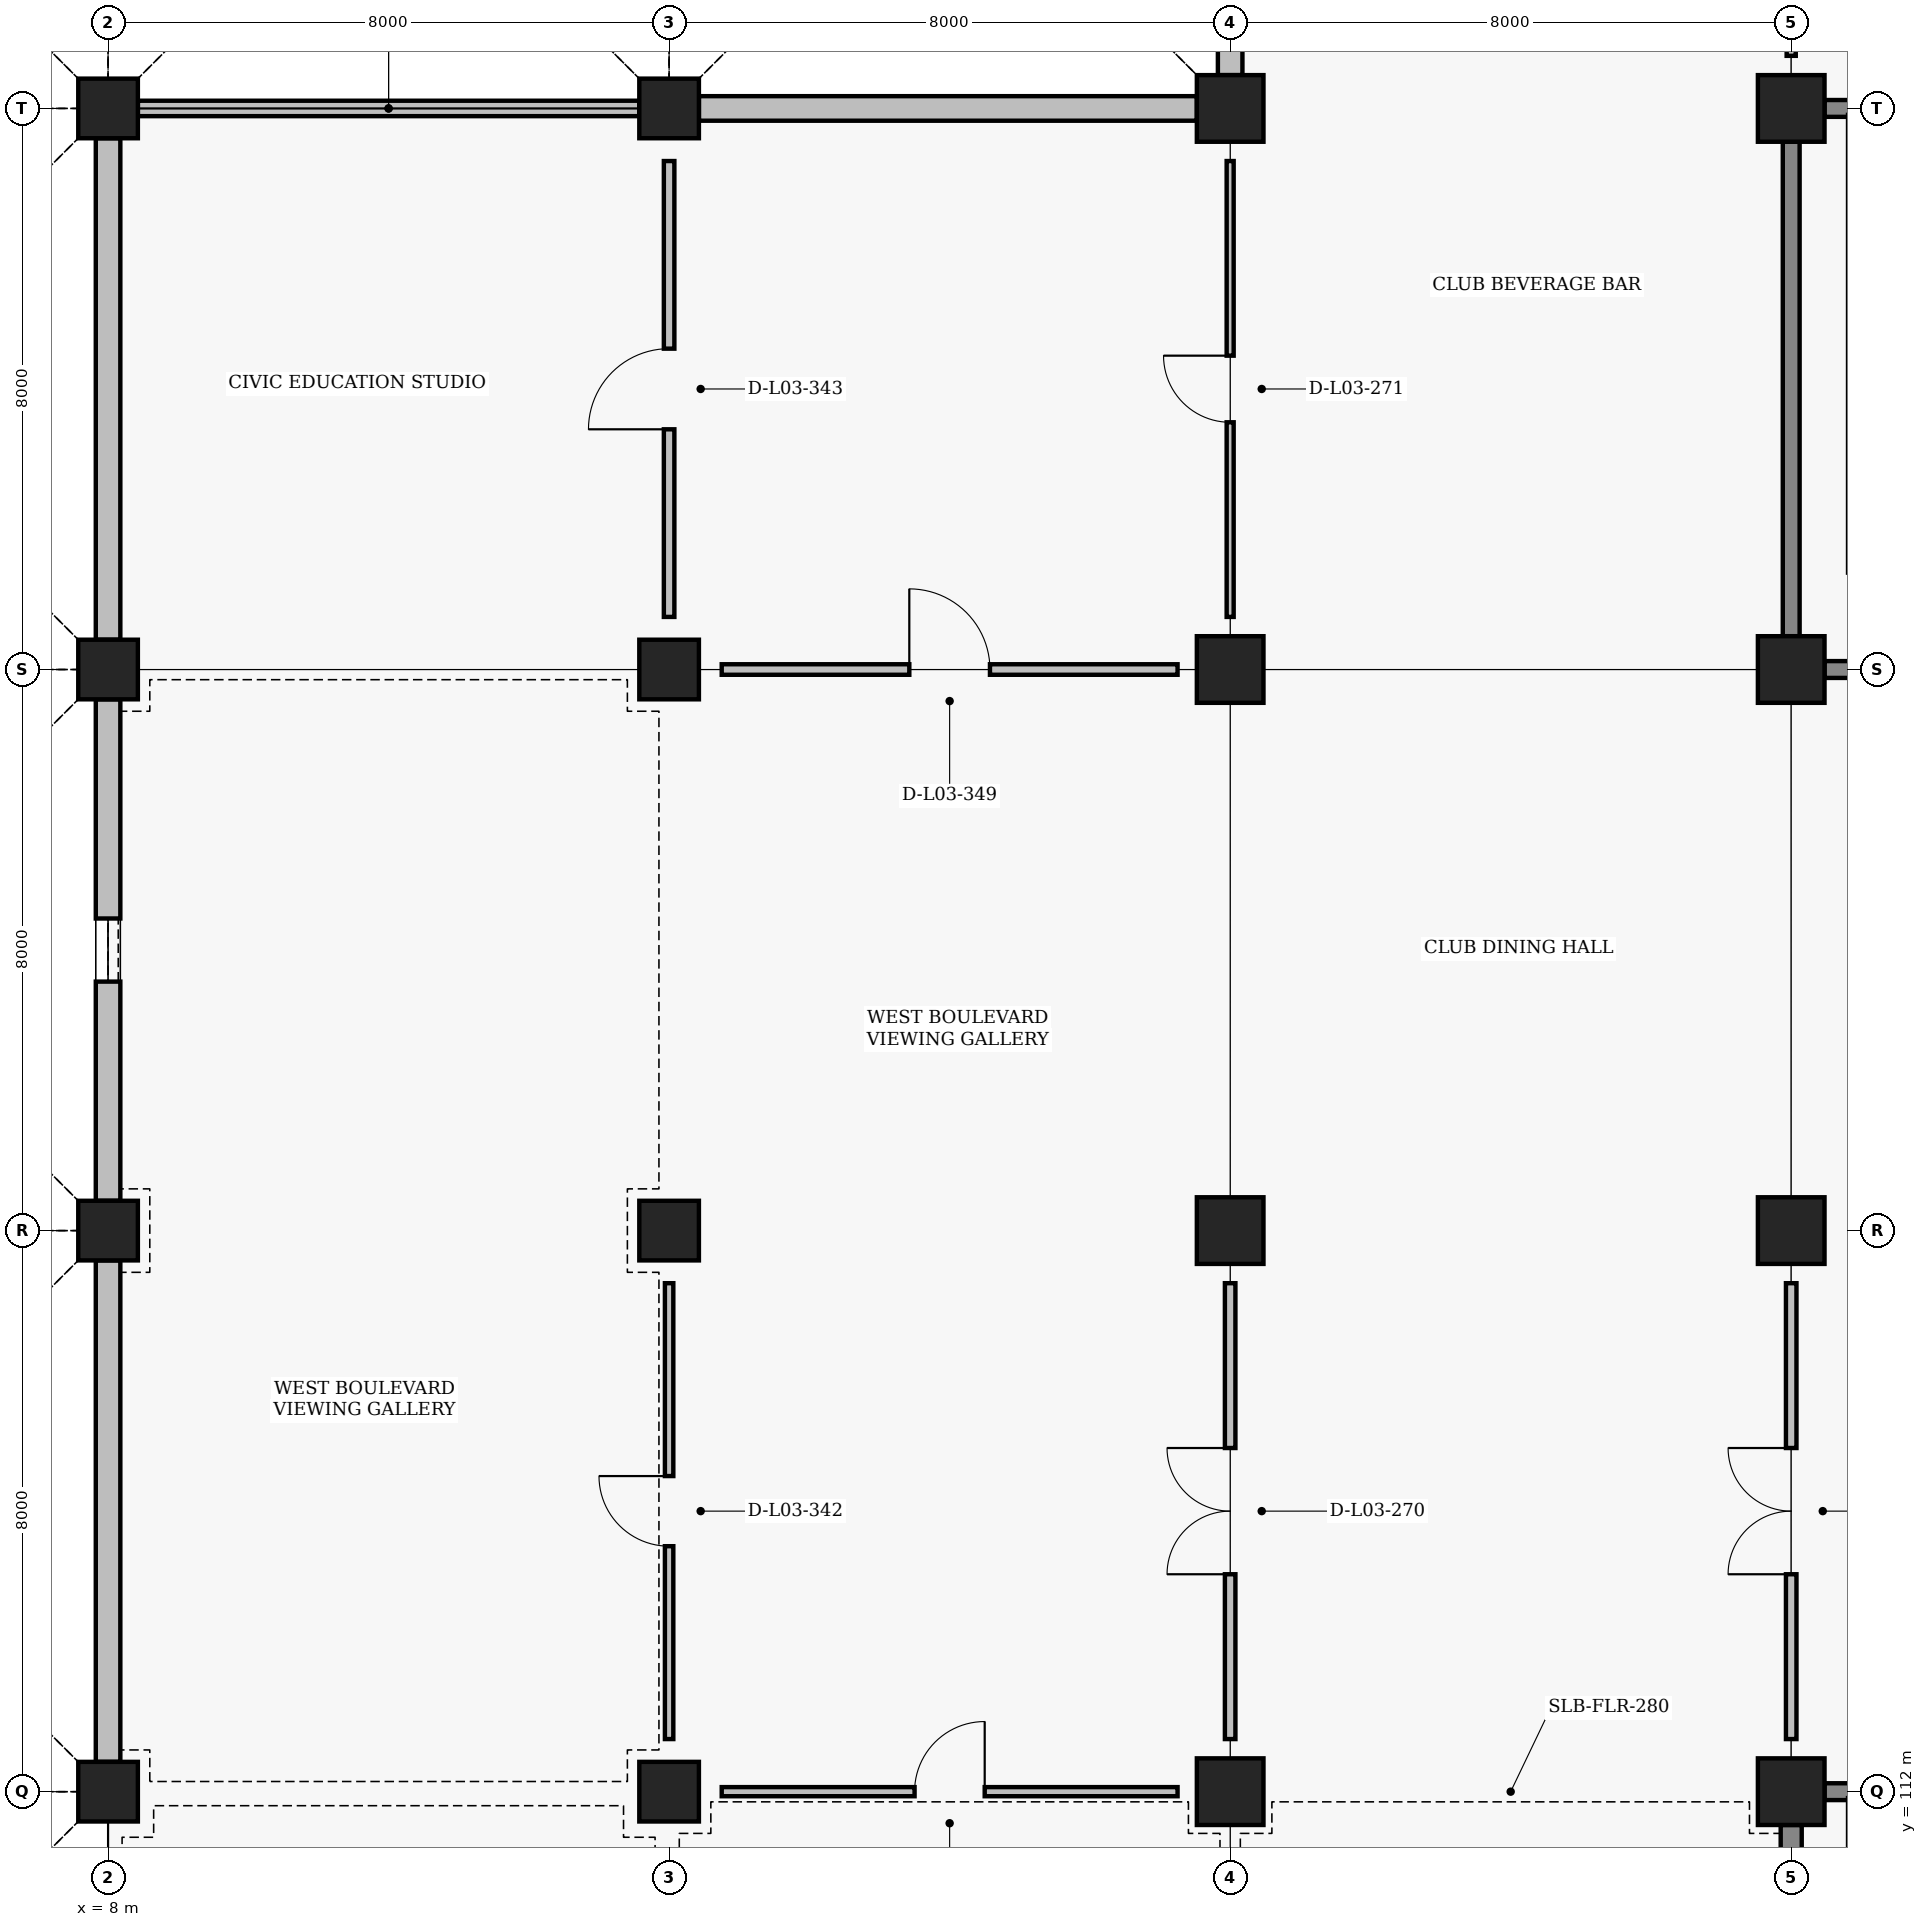
"""IFC4 building model, lengths in metres.
Left out: names, types, materials, properties, quantities, classifications, styles, units other than length and angle.
Written with IfcOpenShell. Run it as: python <this file> out.ifc"""

import sys

from ifc_helpers import new_model, si_unit, direction, frame, frame_2d, origin, origin_2d, place, context, subcontext, project, spatial, rectangle, circle, extrude, element, fill, save


model = new_model("IFC4")
c1 = context("Model", 3, precision=1e-05, world=origin(), true_north=direction((0.0, 1.0)))
c2 = subcontext(c1, "Body", "Model", "MODEL_VIEW")
j1 = project(units=[si_unit("LENGTHUNIT", "METRE"), si_unit("PLANEANGLEUNIT", "RADIAN")], contexts=[c1])
p1 = place(None, origin())
s1 = spatial("IfcSite", under=j1, at=p1, CompositionType="ELEMENT")
p2 = place(p1, origin())
s2 = spatial("IfcBuilding", under=s1, at=p2, CompositionType="ELEMENT")
p3 = place(p2, frame((0.0, 0.0, 9.6)))
s3 = spatial("IfcBuildingStorey", under=s2, at=p3, CompositionType="ELEMENT", Elevation=9.6)
for number, where, z_axis, x_axis in (
    (1, (8.0, 112.0, 0.0), (0.0, 0.0, 1.0), (1.0, 0.0, 0.0)),
    (2, (8.0, 120.0, 0.0), (0.0, 0.0, 1.0), (1.0, 0.0, 0.0)),
    (3, (8.0, 128.0, 0.0), (0.0, 0.0, 1.0), (1.0, 0.0, 0.0)),
    (4, (8.0, 136.0, 0.0), (0.0, 0.0, 1.0), (1.0, 0.0, 0.0)),
    (5, (16.0, 112.0, 0.0), (0.0, 0.0, 1.0), (1.0, 0.0, 0.0)),
    (6, (16.0, 120.0, 0.0), (0.0, 0.0, 1.0), (1.0, 0.0, 0.0)),
    (7, (16.0, 128.0, 0.0), (0.0, 0.0, 1.0), (1.0, 0.0, 0.0)),
    (8, (16.0, 136.0, 0.0), (0.0, 0.0, 1.0), (1.0, 0.0, 0.0)),
):
    element("IfcColumn", number, at=place(p3, frame(where, z_axis=z_axis, x_axis=x_axis)), inside=s3, PredefinedType="COLUMN", context=c2, shape_type="SweptSolid", body=[
        extrude(circle(Radius=0.425, at=origin_2d()), origin(), (0.0, 0.0, 1.0), 4.8),
    ])
for number, where, z_axis, x_axis in (
    (9, (24.0, 112.0, 0.0), (0.0, 0.0, 1.0), (1.0, 0.0, 0.0)),
    (10, (24.0, 120.0, 0.0), (0.0, 0.0, 1.0), (1.0, 0.0, 0.0)),
    (11, (24.0, 128.0, 0.0), (0.0, 0.0, 1.0), (1.0, 0.0, 0.0)),
    (12, (24.0, 136.0, 0.0), (0.0, 0.0, 1.0), (1.0, 0.0, 0.0)),
    (13, (32.0, 112.0, 0.0), (0.0, 0.0, 1.0), (1.0, 0.0, 0.0)),
    (14, (32.0, 120.0, 0.0), (0.0, 0.0, 1.0), (1.0, 0.0, 0.0)),
    (15, (32.0, 128.0, 0.0), (0.0, 0.0, 1.0), (1.0, 0.0, 0.0)),
    (16, (32.0, 136.0, 0.0), (0.0, 0.0, 1.0), (1.0, 0.0, 0.0)),
):
    element("IfcColumn", number, at=place(p3, frame(where, z_axis=z_axis, x_axis=x_axis)), inside=s3, PredefinedType="COLUMN", context=c2, shape_type="SweptSolid", body=[
        extrude(rectangle(XDim=0.95, YDim=0.95, at=origin_2d()), origin(), (0.0, 0.0, 1.0), 4.8),
    ])
p4 = place(p3, frame((8.0, 112.425, 0.0), z_axis=(0.0, 0.0, 1.0), x_axis=(0.0, 1.0, 0.0)))
e17 = element("IfcWall", 17, at=p4, inside=s3, PredefinedType="SOLIDWALL", context=c2, shape_type="SweptSolid", body=[
    extrude(rectangle(XDim=7.15, YDim=0.35, at=frame_2d((3.575, 0.0))), origin(), (0.0, 0.0, 1.0), 3.72),
])
p5 = place(p3, frame((8.0, 120.425, 0.0), z_axis=(0.0, 0.0, 1.0), x_axis=(0.0, 1.0, 0.0)))
e18 = element("IfcWall", 18, at=p5, inside=s3, PredefinedType="SOLIDWALL", context=c2, shape_type="SweptSolid", body=[
    extrude(rectangle(XDim=7.15, YDim=0.35, at=frame_2d((3.575, 0.0))), origin(), (0.0, 0.0, 1.0), 3.72),
])
p6 = place(p5, frame((3.125, 0.0, 0.95)))
e19 = element("IfcOpeningElement", 19, at=p6, cuts=e18, PredefinedType="OPENING", context=c2, shape_type="SweptSolid", body=[
    extrude(rectangle(XDim=0.9, YDim=1.5, at=frame_2d((0.45, 0.75))), frame((0.0, 0.185, 0.0), z_axis=(0.0, -1.0, 0.0), x_axis=(1.0, 0.0, 0.0)), (0.0, 0.0, 1.0), 0.37),
])
p7 = place(p3, frame((8.425, 136.0, 0.0), z_axis=(0.0, 0.0, 1.0), x_axis=(1.0, 0.0, 0.0)))
e20 = element("IfcWall", 20, at=p7, inside=s3, PredefinedType="PARAPET", context=c2, shape_type="SweptSolid", body=[
    extrude(rectangle(XDim=7.15, YDim=0.22, at=frame_2d((3.575, 0.0))), origin(), (0.0, 0.0, 1.0), 0.16),
])
p8 = place(p3, frame((8.0, 128.425, 0.0), z_axis=(0.0, 0.0, 1.0), x_axis=(0.0, 1.0, 0.0)))
e21 = element("IfcWall", 21, at=p8, inside=s3, PredefinedType="SOLIDWALL", context=c2, shape_type="SweptSolid", body=[
    extrude(rectangle(XDim=7.15, YDim=0.35, at=frame_2d((3.575, 0.0))), origin(), (0.0, 0.0, 1.0), 3.95),
])
p9 = place(p3, frame((16.425, 136.0, 0.0), z_axis=(0.0, 0.0, 1.0), x_axis=(1.0, 0.0, 0.0)))
e22 = element("IfcWall", 22, at=p9, inside=s3, PredefinedType="SOLIDWALL", context=c2, shape_type="SweptSolid", body=[
    extrude(rectangle(XDim=7.1, YDim=0.35, at=frame_2d((3.55, 0.0))), origin(), (0.0, 0.0, 1.0), 3.93),
])
p10 = place(p3, frame((24.0, 136.475, 0.0), z_axis=(0.0, 0.0, 1.0), x_axis=(0.0, 1.0, 0.0)))
e23 = element("IfcWall", 23, at=p10, inside=s3, PredefinedType="SOLIDWALL", context=c2, shape_type="SweptSolid", body=[
    extrude(rectangle(XDim=7.05, YDim=0.35, at=frame_2d((3.525, 0.0))), origin(), (0.0, 0.0, 1.0), 3.93),
])
p11 = place(p3, frame((32.475, 112.0, 0.0), z_axis=(0.0, 0.0, 1.0), x_axis=(1.0, 0.0, 0.0)))
e24 = element("IfcWall", 24, at=p11, inside=s3, PredefinedType="SHEAR", context=c2, shape_type="SweptSolid", body=[
    extrude(rectangle(XDim=7.05, YDim=0.24, at=frame_2d((3.525, 0.0))), origin(), (0.0, 0.0, 1.0), 3.93),
])
p12 = place(p3, frame((32.0, 104.475, 0.0), z_axis=(0.0, 0.0, 1.0), x_axis=(0.0, 1.0, 0.0)))
e25 = element("IfcWall", 25, at=p12, inside=s3, PredefinedType="SHEAR", context=c2, shape_type="SweptSolid", body=[
    extrude(rectangle(XDim=7.05, YDim=0.3, at=frame_2d((3.525, 0.0))), origin(), (0.0, 0.0, 1.0), 3.68),
])
p13 = place(p3, frame((32.475, 128.0, 0.0), z_axis=(0.0, 0.0, 1.0), x_axis=(1.0, 0.0, 0.0)))
e26 = element("IfcWall", 26, at=p13, inside=s3, PredefinedType="SHEAR", context=c2, shape_type="SweptSolid", body=[
    extrude(rectangle(XDim=7.05, YDim=0.24, at=frame_2d((3.525, 0.0))), origin(), (0.0, 0.0, 1.0), 3.93),
])
p14 = place(p13, frame((4.9, 0.0, 0.0)))
e27 = element("IfcOpeningElement", 27, at=p14, cuts=e26, PredefinedType="OPENING", context=c2, shape_type="SweptSolid", body=[
    extrude(rectangle(XDim=1.1, YDim=2.2, at=frame_2d((0.55, 1.1))), frame((0.0, 0.13, 0.0), z_axis=(0.0, -1.0, 0.0), x_axis=(1.0, 0.0, 0.0)), (0.0, 0.0, 1.0), 0.26),
])
for number, where, z_axis, x_axis in (
    (28, (32.475, 136.0, 0.0), (0.0, 0.0, 1.0), (1.0, 0.0, 0.0)),
    (29, (32.0, 128.475, 0.0), (0.0, 0.0, 1.0), (0.0, 1.0, 0.0)),
):
    element("IfcWall", number, at=place(p3, frame(where, z_axis=z_axis, x_axis=x_axis)), inside=s3, PredefinedType="SHEAR", context=c2, shape_type="SweptSolid", body=[
        extrude(rectangle(XDim=7.05, YDim=0.24, at=frame_2d((3.525, 0.0))), origin(), (0.0, 0.0, 1.0), 3.93),
    ])
p15 = place(p3, frame((24.0, 112.75, 0.0), z_axis=(0.0, 0.0, 1.0), x_axis=(0.0, 1.0, 0.0)))
e30 = element("IfcWall", 30, at=p15, inside=s3, PredefinedType="PARTITIONING", context=c2, shape_type="SweptSolid", body=[
    extrude(rectangle(XDim=6.5, YDim=0.15, at=frame_2d((3.25, 0.0))), origin(), (0.0, 0.0, 1.0), 3.93),
])
p16 = place(p15, frame((2.35, 0.0, 0.0)))
e31 = element("IfcOpeningElement", 31, at=p16, cuts=e30, PredefinedType="OPENING", context=c2, shape_type="SweptSolid", body=[
    extrude(rectangle(XDim=1.8, YDim=2.3, at=frame_2d((0.9, 1.15))), frame((0.0, 0.085, 0.0), z_axis=(0.0, -1.0, 0.0), x_axis=(1.0, 0.0, 0.0)), (0.0, 0.0, 1.0), 0.17),
])
p17 = place(p3, frame((24.0, 128.75, 0.0), z_axis=(0.0, 0.0, 1.0), x_axis=(0.0, 1.0, 0.0)))
e32 = element("IfcWall", 32, at=p17, inside=s3, PredefinedType="PARTITIONING", context=c2, shape_type="SweptSolid", body=[
    extrude(rectangle(XDim=6.5, YDim=0.1, at=frame_2d((3.25, 0.0))), origin(), (0.0, 0.0, 1.0), 3.93),
])
p18 = place(p17, frame((2.775, 0.0, 0.0)))
e33 = element("IfcOpeningElement", 33, at=p18, cuts=e32, PredefinedType="OPENING", context=c2, shape_type="SweptSolid", body=[
    extrude(rectangle(XDim=0.95, YDim=2.1, at=frame_2d((0.475, 1.05))), frame((0.0, 0.06, 0.0), z_axis=(0.0, -1.0, 0.0), x_axis=(1.0, 0.0, 0.0)), (0.0, 0.0, 1.0), 0.12),
])
p19 = place(p3, frame((32.0, 112.75, 0.0), z_axis=(0.0, 0.0, 1.0), x_axis=(0.0, 1.0, 0.0)))
e34 = element("IfcWall", 34, at=p19, inside=s3, PredefinedType="PARTITIONING", context=c2, shape_type="SweptSolid", body=[
    extrude(rectangle(XDim=6.5, YDim=0.15, at=frame_2d((3.25, 0.0))), origin(), (0.0, 0.0, 1.0), 3.93),
])
p20 = place(p19, frame((2.35, 0.0, 0.0)))
e35 = element("IfcOpeningElement", 35, at=p20, cuts=e34, PredefinedType="OPENING", context=c2, shape_type="SweptSolid", body=[
    extrude(rectangle(XDim=1.8, YDim=2.3, at=frame_2d((0.9, 1.15))), frame((0.0, 0.085, 0.0), z_axis=(0.0, -1.0, 0.0), x_axis=(1.0, 0.0, 0.0)), (0.0, 0.0, 1.0), 0.17),
])
p21 = place(p3, frame((32.0, 136.75, 0.0), z_axis=(0.0, 0.0, 1.0), x_axis=(0.0, 1.0, 0.0)))
e36 = element("IfcWall", 36, at=p21, inside=s3, PredefinedType="PARTITIONING", context=c2, shape_type="SweptSolid", body=[
    extrude(rectangle(XDim=6.5, YDim=0.13, at=frame_2d((3.25, 0.0))), origin(), (0.0, 0.0, 1.0), 3.93),
])
p22 = place(p21, frame((2.75, 0.0, 0.0)))
e37 = element("IfcOpeningElement", 37, at=p22, cuts=e36, PredefinedType="OPENING", context=c2, shape_type="SweptSolid", body=[
    extrude(rectangle(XDim=1.0, YDim=2.1, at=frame_2d((0.5, 1.05))), frame((0.0, 0.075, 0.0), z_axis=(0.0, -1.0, 0.0), x_axis=(1.0, 0.0, 0.0)), (0.0, 0.0, 1.0), 0.15),
])
p23 = place(p3, frame((16.0, 112.75, 0.0), z_axis=(0.0, 0.0, 1.0), x_axis=(0.0, 1.0, 0.0)))
e38 = element("IfcWall", 38, at=p23, inside=s3, PredefinedType="PARTITIONING", context=c2, shape_type="SweptSolid", body=[
    extrude(rectangle(XDim=6.5, YDim=0.12, at=frame_2d((3.25, 0.0))), origin(), (0.0, 0.0, 1.0), 3.97),
])
p24 = place(p23, frame((2.75, 0.0, 0.0)))
e39 = element("IfcOpeningElement", 39, at=p24, cuts=e38, PredefinedType="OPENING", context=c2, shape_type="SweptSolid", body=[
    extrude(rectangle(XDim=1.0, YDim=2.1, at=frame_2d((0.5, 1.05))), frame((0.0, 0.07, 0.0), z_axis=(0.0, -1.0, 0.0), x_axis=(1.0, 0.0, 0.0)), (0.0, 0.0, 1.0), 0.14),
])
p25 = place(p3, frame((16.0, 128.75, 0.0), z_axis=(0.0, 0.0, 1.0), x_axis=(0.0, 1.0, 0.0)))
e40 = element("IfcWall", 40, at=p25, inside=s3, PredefinedType="PARTITIONING", context=c2, shape_type="SweptSolid", body=[
    extrude(rectangle(XDim=6.5, YDim=0.15, at=frame_2d((3.25, 0.0))), origin(), (0.0, 0.0, 1.0), 3.97),
])
p26 = place(p25, frame((2.675, 0.0, 0.0)))
e41 = element("IfcOpeningElement", 41, at=p26, cuts=e40, PredefinedType="OPENING", context=c2, shape_type="SweptSolid", body=[
    extrude(rectangle(XDim=1.15, YDim=2.15, at=frame_2d((0.575, 1.075))), frame((0.0, 0.085, 0.0), z_axis=(0.0, -1.0, 0.0), x_axis=(1.0, 0.0, 0.0)), (0.0, 0.0, 1.0), 0.17),
])
p27 = place(p3, frame((16.75, 112.0, 0.0), z_axis=(0.0, 0.0, 1.0), x_axis=(1.0, 0.0, 0.0)))
e42 = element("IfcWall", 42, at=p27, inside=s3, PredefinedType="PARTITIONING", context=c2, shape_type="SweptSolid", body=[
    extrude(rectangle(XDim=6.5, YDim=0.13, at=frame_2d((3.25, 0.0))), origin(), (0.0, 0.0, 1.0), 3.72),
])
p28 = place(p27, frame((2.75, 0.0, 0.0)))
e43 = element("IfcOpeningElement", 43, at=p28, cuts=e42, PredefinedType="OPENING", context=c2, shape_type="SweptSolid", body=[
    extrude(rectangle(XDim=1.0, YDim=2.1, at=frame_2d((0.5, 1.05))), frame((0.0, 0.075, 0.0), z_axis=(0.0, -1.0, 0.0), x_axis=(1.0, 0.0, 0.0)), (0.0, 0.0, 1.0), 0.15),
])
p29 = place(p3, frame((16.75, 128.0, 0.0), z_axis=(0.0, 0.0, 1.0), x_axis=(1.0, 0.0, 0.0)))
e44 = element("IfcWall", 44, at=p29, inside=s3, PredefinedType="PARTITIONING", context=c2, shape_type="SweptSolid", body=[
    extrude(rectangle(XDim=6.5, YDim=0.15, at=frame_2d((3.25, 0.0))), origin(), (0.0, 0.0, 1.0), 3.97),
])
p30 = place(p29, frame((2.675, 0.0, 0.0)))
e45 = element("IfcOpeningElement", 45, at=p30, cuts=e44, PredefinedType="OPENING", context=c2, shape_type="SweptSolid", body=[
    extrude(rectangle(XDim=1.15, YDim=2.15, at=frame_2d((0.575, 1.075))), frame((0.0, 0.085, 0.0), z_axis=(0.0, -1.0, 0.0), x_axis=(1.0, 0.0, 0.0)), (0.0, 0.0, 1.0), 0.17),
])
p31 = place(p6, origin())
e46 = element("IfcWindow", 46, at=p31, inside=s3, PartitioningType="SINGLE_PANEL", PredefinedType="WINDOW", context=c2, shape_type="SweptSolid", body=[
    extrude(rectangle(XDim=0.9, YDim=1.5, at=frame_2d((0.45, 0.75))), frame((0.0, 0.03, 0.0), z_axis=(0.0, -1.0, 0.0), x_axis=(1.0, 0.0, 0.0)), (0.0, 0.0, 1.0), 0.06),
])
fill(e19, e46)
p32 = place(p16, origin())
e47 = element("IfcDoor", 47, at=p32, inside=s3, OperationType="DOUBLE_SWING_LEFT", PredefinedType="DOOR", context=c2, shape_type="SweptSolid", body=[
    extrude(rectangle(XDim=1.8, YDim=2.3, at=frame_2d((0.9, 1.15))), frame((0.0, 0.025, 0.0), z_axis=(0.0, -1.0, 0.0), x_axis=(1.0, 0.0, 0.0)), (0.0, 0.0, 1.0), 0.05),
])
fill(e31, e47)
p33 = place(p18, origin())
e48 = element("IfcDoor", 48, at=p33, inside=s3, OperationType="SINGLE_SWING_RIGHT", PredefinedType="DOOR", context=c2, shape_type="SweptSolid", body=[
    extrude(rectangle(XDim=0.95, YDim=2.1, at=frame_2d((0.475, 1.05))), frame((0.0, 0.025, 0.0), z_axis=(0.0, -1.0, 0.0), x_axis=(1.0, 0.0, 0.0)), (0.0, 0.0, 1.0), 0.05),
])
fill(e33, e48)
p34 = place(p20, origin())
e49 = element("IfcDoor", 49, at=p34, inside=s3, OperationType="DOUBLE_SWING_LEFT", PredefinedType="DOOR", context=c2, shape_type="SweptSolid", body=[
    extrude(rectangle(XDim=1.8, YDim=2.3, at=frame_2d((0.9, 1.15))), frame((0.0, 0.025, 0.0), z_axis=(0.0, -1.0, 0.0), x_axis=(1.0, 0.0, 0.0)), (0.0, 0.0, 1.0), 0.05),
])
fill(e35, e49)
p35 = place(p24, origin())
e50 = element("IfcDoor", 50, at=p35, inside=s3, OperationType="SINGLE_SWING_RIGHT", PredefinedType="DOOR", context=c2, shape_type="SweptSolid", body=[
    extrude(rectangle(XDim=1.0, YDim=2.1, at=frame_2d((0.5, 1.05))), frame((0.0, 0.025, 0.0), z_axis=(0.0, -1.0, 0.0), x_axis=(1.0, 0.0, 0.0)), (0.0, 0.0, 1.0), 0.05),
])
fill(e39, e50)
p36 = place(p26, origin())
e51 = element("IfcDoor", 51, at=p36, inside=s3, OperationType="SINGLE_SWING_LEFT", PredefinedType="DOOR", context=c2, shape_type="SweptSolid", body=[
    extrude(rectangle(XDim=1.15, YDim=2.15, at=frame_2d((0.575, 1.075))), frame((0.0, 0.025, 0.0), z_axis=(0.0, -1.0, 0.0), x_axis=(1.0, 0.0, 0.0)), (0.0, 0.0, 1.0), 0.05),
])
fill(e41, e51)
p37 = place(p28, origin())
e52 = element("IfcDoor", 52, at=p37, inside=s3, OperationType="SINGLE_SWING_RIGHT", PredefinedType="DOOR", context=c2, shape_type="SweptSolid", body=[
    extrude(rectangle(XDim=1.0, YDim=2.1, at=frame_2d((0.5, 1.05))), frame((0.0, 0.025, 0.0), z_axis=(0.0, -1.0, 0.0), x_axis=(1.0, 0.0, 0.0)), (0.0, 0.0, 1.0), 0.05),
])
fill(e43, e52)
p38 = place(p30, origin())
e53 = element("IfcDoor", 53, at=p38, inside=s3, OperationType="SINGLE_SWING_LEFT", PredefinedType="DOOR", context=c2, shape_type="SweptSolid", body=[
    extrude(rectangle(XDim=1.15, YDim=2.15, at=frame_2d((0.575, 1.075))), frame((0.0, 0.025, 0.0), z_axis=(0.0, -1.0, 0.0), x_axis=(1.0, 0.0, 0.0)), (0.0, 0.0, 1.0), 0.05),
])
fill(e45, e53)
save(model, sys.argv[1])
